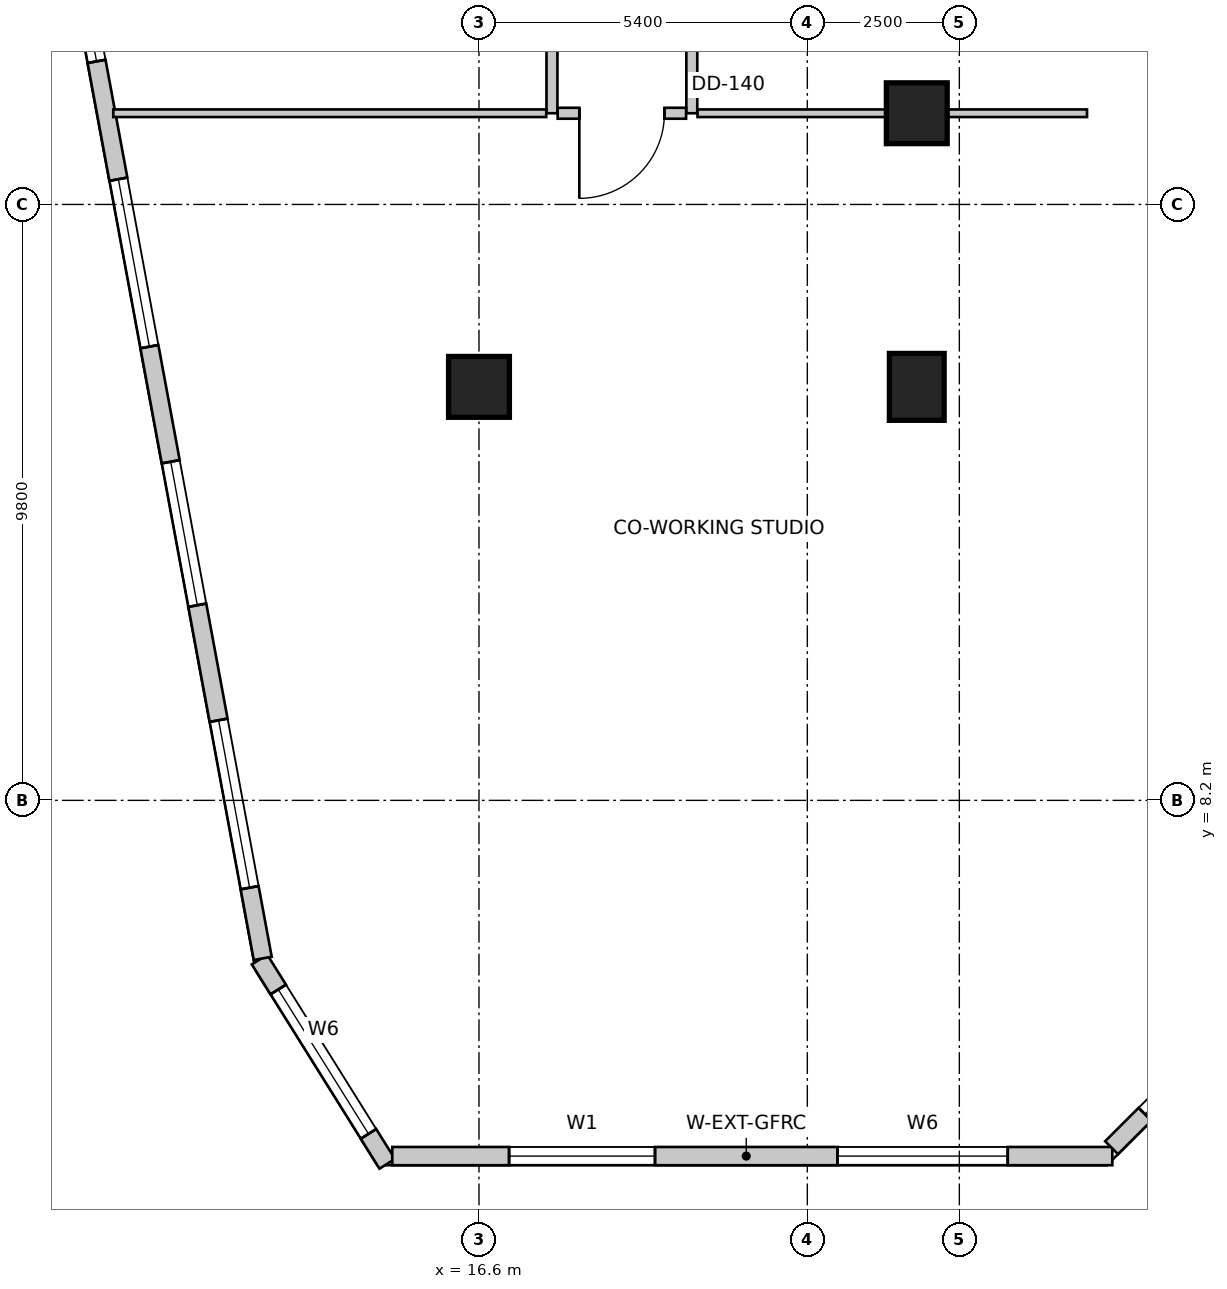
"""IFC4 building model, lengths in metres.
Left out: names, types, materials, properties, quantities, classifications, styles, units other than length and angle.
Written with IfcOpenShell. Run it as: python <this file> out.ifc"""

import sys

from ifc_helpers import new_model, si_unit, direction, frame, frame_2d, origin, origin_2d, place, context, subcontext, project, spatial, rectangle, extrude, source, transform, mapped, element, fill, save


model = new_model("IFC4")
c1 = context("Model", 3, precision=1e-05, world=origin(), true_north=direction((0.0, 1.0)))
c2 = subcontext(c1, "Body", "Model", "MODEL_VIEW")
j1 = project(units=[si_unit("LENGTHUNIT", "METRE"), si_unit("PLANEANGLEUNIT", "RADIAN")], contexts=[c1])
p1 = place(None, origin())
s1 = spatial("IfcSite", under=j1, at=p1, CompositionType="ELEMENT")
p2 = place(p1, origin())
s2 = spatial("IfcBuilding", under=s1, at=p2, CompositionType="ELEMENT")
p3 = place(p2, frame((0.0, 0.0, 87.0)))
s3 = spatial("IfcBuildingStorey", under=s2, at=p3, CompositionType="ELEMENT", Elevation=87.0)
m1 = source(origin(), c2, "Body", "SweptSolid", [
    extrude(rectangle(XDim=1.0, YDim=1.0, at=origin_2d()), origin(), (0.0, 0.0, 1.0), 4.0),
])
p4 = place(p3, frame((23.8, 19.5, 0.0), z_axis=(0.0, 0.0, 1.0), x_axis=(1.0, 0.0, 0.0)))
e1 = element("IfcColumn", 1, at=p4, inside=s3, PredefinedType="COLUMN", context=c2, shape_type="MappedRepresentation", body=[
    mapped(m1, transform((0.0, 0.0, 0.0), scale=1.0)),
])
m2 = source(origin(), c2, "Body", "SweptSolid", [
    extrude(rectangle(XDim=0.9, YDim=1.1, at=origin_2d()), origin(), (0.0, 0.0, 1.0), 4.0),
])
p5 = place(p3, frame((23.8, 15.0, 0.0), z_axis=(0.0, 0.0, 1.0), x_axis=(1.0, 0.0, 0.0)))
e2 = element("IfcColumn", 2, at=p5, inside=s3, PredefinedType="COLUMN", context=c2, shape_type="MappedRepresentation", body=[
    mapped(m2, transform((0.0, 0.0, 0.0), scale=1.0)),
])
p6 = place(p3, frame((16.6, 15.0, 0.0), z_axis=(0.0, 0.0, 1.0), x_axis=(1.0, 0.0, 0.0)))
e3 = element("IfcColumn", 3, at=p6, inside=s3, PredefinedType="COLUMN", context=c2, shape_type="MappedRepresentation", body=[
    mapped(m1, transform((0.0, 0.0, 0.0), scale=1.0)),
])
p7 = place(p3, frame((12.991, 5.583, 0.0), z_axis=(0.0, 0.0, 1.0), x_axis=(0.530015557218, -0.847987918019, 0.0)))
e4 = element("IfcWall", 4, at=p7, inside=s3, PredefinedType="SOLIDWALL", context=c2, shape_type="SweptSolid", body=[
    extrude(rectangle(XDim=3.962, YDim=0.3, at=frame_2d((1.981, 0.0))), origin(), (0.0, 0.0, 1.0), 3.75),
])
m3 = source(origin(), c2, "Body", "SweptSolid", [
    extrude(rectangle(XDim=2.8, YDim=2.4, at=frame_2d((1.4, 1.2))), frame((0.0, 0.16, 0.0), z_axis=(0.0, -1.0, 0.0), x_axis=(1.0, 0.0, 0.0)), (0.0, 0.0, 1.0), 0.32),
])
p8 = place(p7, frame((0.581, 0.0, 0.85)))
e5 = element("IfcOpeningElement", 5, at=p8, cuts=e4, PredefinedType="OPENING", context=c2, shape_type="MappedRepresentation", body=[
    mapped(m3, transform((0.0, 0.0, 0.0), scale=1.0)),
])
p9 = place(p3, frame((15.174, 2.35, 0.0), z_axis=(0.0, 0.0, 1.0), x_axis=(1.0, 0.0, 0.0)))
e6 = element("IfcWall", 6, at=p9, inside=s3, PredefinedType="SOLIDWALL", context=c2, shape_type="SweptSolid", body=[
    extrude(rectangle(XDim=11.842, YDim=0.3, at=frame_2d((5.921, 0.0))), origin(), (0.0, 0.0, 1.0), 3.75),
])
m4 = source(origin(), c2, "Body", "SweptSolid", [
    extrude(rectangle(XDim=2.4, YDim=2.2, at=frame_2d((1.2, 1.1))), frame((0.0, 0.16, 0.0), z_axis=(0.0, -1.0, 0.0), x_axis=(1.0, 0.0, 0.0)), (0.0, 0.0, 1.0), 0.32),
])
p10 = place(p9, frame((1.921, 0.0, 0.85)))
e7 = element("IfcOpeningElement", 7, at=p10, cuts=e6, PredefinedType="OPENING", context=c2, shape_type="MappedRepresentation", body=[
    mapped(m4, transform((0.0, 0.0, 0.0), scale=1.0)),
])
p11 = place(p9, frame((7.322, 0.0, 0.85)))
e8 = element("IfcOpeningElement", 8, at=p11, cuts=e6, PredefinedType="OPENING", context=c2, shape_type="MappedRepresentation", body=[
    mapped(m3, transform((0.0, 0.0, 0.0), scale=1.0)),
])
p12 = place(p3, frame((27.004, 2.488, 0.0), z_axis=(0.0, 0.0, 1.0), x_axis=(0.707106781187, 0.707106781187, 0.0)))
e9 = element("IfcWall", 9, at=p12, inside=s3, PredefinedType="SOLIDWALL", context=c2, shape_type="SweptSolid", body=[
    extrude(rectangle(XDim=4.356, YDim=0.3, at=frame_2d((2.178, 0.0))), origin(), (0.0, 0.0, 1.0), 3.75),
])
p13 = place(p12, frame((0.778, 0.0, 0.85)))
e10 = element("IfcOpeningElement", 10, at=p13, cuts=e9, PredefinedType="OPENING", context=c2, shape_type="MappedRepresentation", body=[
    mapped(m3, transform((0.0, 0.0, 0.0), scale=1.0)),
])
p14 = place(p3, frame((8.183, 31.833, 0.0), z_axis=(0.0, 0.0, 1.0), x_axis=(0.18216364648, -0.983268226834, 0.0)))
e11 = element("IfcWall", 11, at=p14, inside=s3, PredefinedType="SOLIDWALL", context=c2, shape_type="SweptSolid", body=[
    extrude(rectangle(XDim=26.678, YDim=0.3, at=frame_2d((13.339, 0.0))), origin(), (0.0, 0.0, 1.0), 3.75),
])
p15 = place(p14, frame((2.952, 0.0, 0.85)))
e12 = element("IfcOpeningElement", 12, at=p15, cuts=e11, PredefinedType="OPENING", context=c2, shape_type="MappedRepresentation", body=[
    mapped(m3, transform((0.0, 0.0, 0.0), scale=1.0)),
])
p16 = place(p14, frame((8.876, 0.0, 0.85)))
e13 = element("IfcOpeningElement", 13, at=p16, cuts=e11, PredefinedType="OPENING", context=c2, shape_type="MappedRepresentation", body=[
    mapped(m3, transform((0.0, 0.0, 0.0), scale=1.0)),
])
p17 = place(p14, frame((13.647, 0.0, 0.85)))
e14 = element("IfcOpeningElement", 14, at=p17, cuts=e11, PredefinedType="OPENING", context=c2, shape_type="MappedRepresentation", body=[
    mapped(m3, transform((0.0, 0.0, 0.0), scale=1.0)),
])
p18 = place(p14, frame((18.372, 0.0, 0.85)))
e15 = element("IfcOpeningElement", 15, at=p18, cuts=e11, PredefinedType="OPENING", context=c2, shape_type="MappedRepresentation", body=[
    mapped(m4, transform((0.0, 0.0, 0.0), scale=1.0)),
])
p19 = place(p14, frame((22.696, 0.0, 0.85)))
e16 = element("IfcOpeningElement", 16, at=p19, cuts=e11, PredefinedType="OPENING", context=c2, shape_type="MappedRepresentation", body=[
    mapped(m3, transform((0.0, 0.0, 0.0), scale=1.0)),
])
p20 = place(p3, frame((17.8, 19.5, 0.0), z_axis=(0.0, 0.0, 1.0), x_axis=(0.0, 1.0, 0.0)))
e17 = element("IfcWall", 17, at=p20, inside=s3, PredefinedType="PARTITIONING", context=c2, shape_type="SweptSolid", body=[
    extrude(rectangle(XDim=4.338, YDim=0.18, at=frame_2d((2.169, 0.0))), origin(), (0.0, 0.0, 1.0), 3.188),
])
m5 = source(origin(), c2, "Body", "SweptSolid", [
    extrude(rectangle(XDim=0.9, YDim=2.15, at=frame_2d((0.45, 1.075))), frame((0.0, 0.1, 0.0), z_axis=(0.0, -1.0, 0.0), x_axis=(1.0, 0.0, 0.0)), (0.0, 0.0, 1.0), 0.2),
])
p21 = place(p20, frame((1.656, 0.0, 0.0)))
e18 = element("IfcOpeningElement", 18, at=p21, cuts=e17, PredefinedType="OPENING", context=c2, shape_type="MappedRepresentation", body=[
    mapped(m5, transform((0.0, 0.0, 0.0), scale=1.0)),
])
p22 = place(p3, frame((20.1, 23.838, 0.0), z_axis=(0.0, 0.0, 1.0), x_axis=(0.0, -1.0, 0.0)))
e19 = element("IfcWall", 19, at=p22, inside=s3, PredefinedType="PARTITIONING", context=c2, shape_type="SweptSolid", body=[
    extrude(rectangle(XDim=4.338, YDim=0.18, at=frame_2d((2.169, 0.0))), origin(), (0.0, 0.0, 1.0), 3.188),
])
p23 = place(p22, frame((1.656, 0.0, 0.0)))
e20 = element("IfcOpeningElement", 20, at=p23, cuts=e19, PredefinedType="OPENING", context=c2, shape_type="MappedRepresentation", body=[
    mapped(m5, transform((0.0, 0.0, 0.0), scale=1.0)),
])
p24 = place(p3, frame((20.006, 19.5, 0.0), z_axis=(0.0, 0.0, 1.0), x_axis=(-1.0, 0.0, 0.0)))
e21 = element("IfcWall", 21, at=p24, inside=s3, PredefinedType="PARTITIONING", context=c2, shape_type="SweptSolid", body=[
    extrude(rectangle(XDim=2.112, YDim=0.18, at=frame_2d((1.056, 0.0))), origin(), (0.0, 0.0, 1.0), 3.75),
])
m6 = source(origin(), c2, "Body", "SweptSolid", [
    extrude(rectangle(XDim=1.4, YDim=2.15, at=frame_2d((0.7, 1.075))), frame((0.0, 0.1, 0.0), z_axis=(0.0, -1.0, 0.0), x_axis=(1.0, 0.0, 0.0)), (0.0, 0.0, 1.0), 0.2),
])
p25 = place(p24, frame((0.356, 0.0, 0.0)))
e22 = element("IfcOpeningElement", 22, at=p25, cuts=e21, PredefinedType="OPENING", context=c2, shape_type="MappedRepresentation", body=[
    mapped(m6, transform((0.0, 0.0, 0.0), scale=1.0)),
])
p26 = place(p3, frame((17.706, 19.5, 0.0), z_axis=(0.0, 0.0, 1.0), x_axis=(-1.0, 0.0, 0.0)))
e23 = element("IfcWall", 23, at=p26, inside=s3, PredefinedType="PARTITIONING", context=c2, shape_type="SweptSolid", body=[
    extrude(rectangle(XDim=7.121, YDim=0.125, at=frame_2d((3.561, 0.0))), origin(), (0.0, 0.0, 1.0), 3.75),
])
p27 = place(p3, frame((26.6, 19.5, 0.0), z_axis=(0.0, 0.0, 1.0), x_axis=(-1.0, 0.0, 0.0)))
e24 = element("IfcWall", 24, at=p27, inside=s3, PredefinedType="PARTITIONING", context=c2, shape_type="SweptSolid", body=[
    extrude(rectangle(XDim=6.406, YDim=0.125, at=frame_2d((3.203, 0.0))), origin(), (0.0, 0.0, 1.0), 2.892),
])
m7 = source(origin(), c2, "Body", "SweptSolid", [
    extrude(rectangle(XDim=2.8, YDim=2.4, at=frame_2d((1.4, 1.2))), frame((0.0, -0.015, 0.0), z_axis=(0.0, -1.0, 0.0), x_axis=(1.0, 0.0, 0.0)), (0.0, 0.0, 1.0), 0.06),
])
p28 = place(p8, origin())
e25 = element("IfcWindow", 25, at=p28, inside=s3, PartitioningType="SINGLE_PANEL", PredefinedType="WINDOW", context=c2, shape_type="MappedRepresentation", body=[
    mapped(m7, transform((0.0, 0.0, 0.0), scale=1.0)),
])
fill(e5, e25)
m8 = source(origin(), c2, "Body", "SweptSolid", [
    extrude(rectangle(XDim=2.4, YDim=2.2, at=frame_2d((1.2, 1.1))), frame((0.0, -0.015, 0.0), z_axis=(0.0, -1.0, 0.0), x_axis=(1.0, 0.0, 0.0)), (0.0, 0.0, 1.0), 0.06),
])
p29 = place(p10, origin())
e26 = element("IfcWindow", 26, at=p29, inside=s3, PartitioningType="SINGLE_PANEL", PredefinedType="WINDOW", context=c2, shape_type="MappedRepresentation", body=[
    mapped(m8, transform((0.0, 0.0, 0.0), scale=1.0)),
])
fill(e7, e26)
p30 = place(p11, origin())
e27 = element("IfcWindow", 27, at=p30, inside=s3, PartitioningType="SINGLE_PANEL", PredefinedType="WINDOW", context=c2, shape_type="MappedRepresentation", body=[
    mapped(m7, transform((0.0, 0.0, 0.0), scale=1.0)),
])
fill(e8, e27)
p31 = place(p13, origin())
e28 = element("IfcWindow", 28, at=p31, inside=s3, PartitioningType="SINGLE_PANEL", PredefinedType="WINDOW", context=c2, shape_type="MappedRepresentation", body=[
    mapped(m7, transform((0.0, 0.0, 0.0), scale=1.0)),
])
fill(e10, e28)
p32 = place(p16, origin())
e29 = element("IfcWindow", 29, at=p32, inside=s3, PartitioningType="SINGLE_PANEL", PredefinedType="WINDOW", context=c2, shape_type="MappedRepresentation", body=[
    mapped(m7, transform((0.0, 0.0, 0.0), scale=1.0)),
])
fill(e13, e29)
p33 = place(p17, origin())
e30 = element("IfcWindow", 30, at=p33, inside=s3, PartitioningType="SINGLE_PANEL", PredefinedType="WINDOW", context=c2, shape_type="MappedRepresentation", body=[
    mapped(m7, transform((0.0, 0.0, 0.0), scale=1.0)),
])
fill(e14, e30)
p34 = place(p18, origin())
e31 = element("IfcWindow", 31, at=p34, inside=s3, PartitioningType="SINGLE_PANEL", PredefinedType="WINDOW", context=c2, shape_type="MappedRepresentation", body=[
    mapped(m8, transform((0.0, 0.0, 0.0), scale=1.0)),
])
fill(e15, e31)
p35 = place(p19, origin())
e32 = element("IfcWindow", 32, at=p35, inside=s3, PartitioningType="SINGLE_PANEL", PredefinedType="WINDOW", context=c2, shape_type="MappedRepresentation", body=[
    mapped(m7, transform((0.0, 0.0, 0.0), scale=1.0)),
])
fill(e16, e32)
m9 = source(origin(), c2, "Body", "SweptSolid", [
    extrude(rectangle(XDim=1.4, YDim=2.15, at=frame_2d((0.7, 1.075))), frame((0.0, 0.025, 0.0), z_axis=(0.0, -1.0, 0.0), x_axis=(1.0, 0.0, 0.0)), (0.0, 0.0, 1.0), 0.05),
])
p36 = place(p25, origin())
e33 = element("IfcDoor", 33, at=p36, inside=s3, OperationType="SINGLE_SWING_RIGHT", PredefinedType="DOOR", context=c2, shape_type="MappedRepresentation", body=[
    mapped(m9, transform((0.0, 0.0, 0.0), scale=1.0)),
])
fill(e22, e33)
save(model, sys.argv[1])
